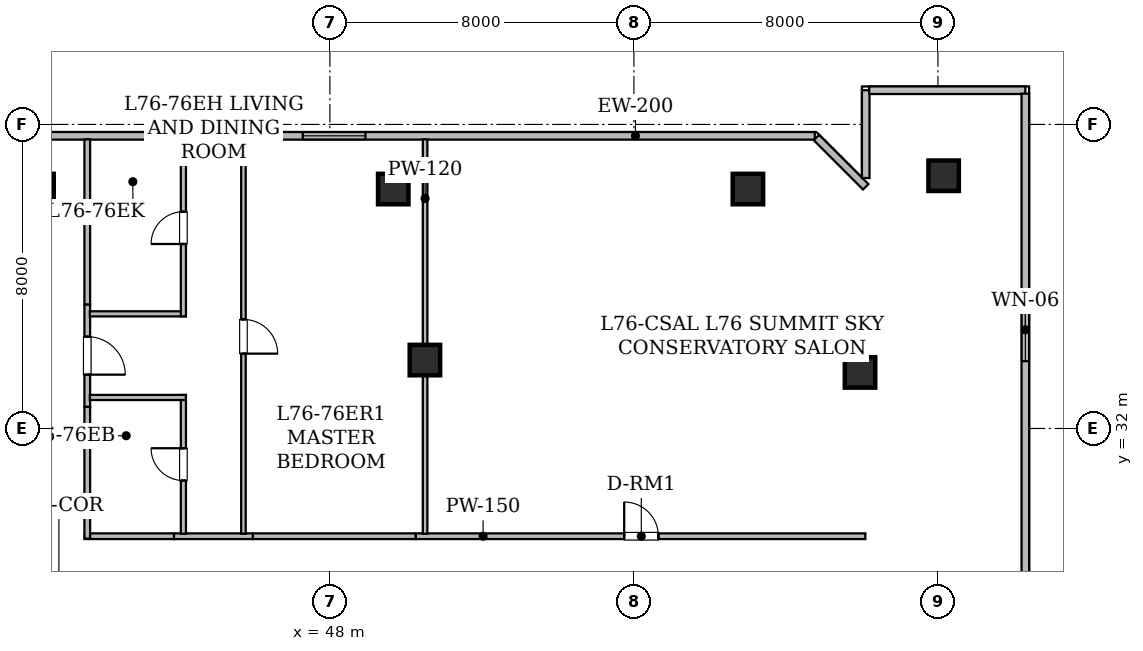
"""IFC4 building model, lengths in metres.
Left out: names, types, materials, properties, quantities, classifications, styles, units other than length and angle.
Written with IfcOpenShell. Run it as: python <this file> out.ifc"""

import sys

from ifc_helpers import new_model, si_unit, direction, frame, frame_2d, origin, origin_2d, place, context, subcontext, project, spatial, rectangle, hollow_rectangle, extrude, element, fill, save


model = new_model("IFC4")
c1 = context("Model", 3, precision=1e-05, world=origin(), true_north=direction((0.0, 1.0)))
c2 = subcontext(c1, "Body", "Model", "MODEL_VIEW")
j1 = project(units=[si_unit("LENGTHUNIT", "METRE"), si_unit("PLANEANGLEUNIT", "RADIAN")], contexts=[c1])
p1 = place(None, origin())
s1 = spatial("IfcSite", under=j1, at=p1, CompositionType="ELEMENT")
p2 = place(p1, origin())
s2 = spatial("IfcBuilding", under=s1, at=p2, CompositionType="ELEMENT")
p3 = place(p2, frame((0.0, 0.0, 298.85)))
s3 = spatial("IfcBuildingStorey", under=s2, at=p3, CompositionType="ELEMENT", Elevation=298.85)
for number, where, z_axis, x_axis in (
    (1, (40.333, 38.3, 0.0), (0.0, 0.0, 1.0), (1.0, 0.0, 0.0)),
    (2, (49.667, 38.3, 0.0), (0.0, 0.0, 1.0), (1.0, 0.0, 0.0)),
    (3, (59.0, 38.3, 0.0), (0.0, 0.0, 1.0), (1.0, 0.0, 0.0)),
    (4, (61.95, 33.475, 0.0), (0.0, 0.0, 1.0), (1.0, 0.0, 0.0)),
    (5, (50.5, 33.8, 0.0), (0.0, 0.0, 1.0), (1.0, 0.0, 0.0)),
):
    element("IfcColumn", number, at=place(p3, frame(where, z_axis=z_axis, x_axis=x_axis)), inside=s3, PredefinedType="COLUMN", context=c2, shape_type="SweptSolid", body=[
        extrude(hollow_rectangle(XDim=0.8, YDim=0.8, WallThickness=0.04, at=origin_2d()), origin(), (0.0, 0.0, 1.0), 4.2),
    ])
p4 = place(p3, frame((64.15, 38.65, 0.0), z_axis=(0.0, 0.0, 1.0), x_axis=(1.0, 0.0, 0.0)))
e6 = element("IfcColumn", 6, at=p4, inside=s3, PredefinedType="COLUMN", context=c2, shape_type="SweptSolid", body=[
    extrude(hollow_rectangle(XDim=0.8, YDim=0.8, WallThickness=0.04, at=origin_2d()), origin(), (0.0, 0.0, 1.0), 4.175),
])
p5 = place(p3, frame((29.302, 39.7, 0.0), z_axis=(0.0, 0.0, 1.0), x_axis=(1.0, 0.0, 0.0)))
e7 = element("IfcWall", 7, at=p5, inside=s3, PredefinedType="STANDARD", context=c2, shape_type="SweptSolid", body=[
    extrude(rectangle(XDim=31.457, YDim=0.2, at=frame_2d((15.729, 0.0))), origin(), (0.0, 0.0, 1.0), 3.33),
])
p6 = place(p5, frame((15.033, 0.0, 0.8)))
e8 = element("IfcOpeningElement", 8, at=p6, cuts=e7, PredefinedType="OPENING", context=c2, shape_type="SweptSolid", body=[
    extrude(rectangle(XDim=1.2, YDim=1.5, at=frame_2d((0.6, 0.75))), frame((0.0, 0.11, 0.0), z_axis=(0.0, -1.0, 0.0), x_axis=(1.0, 0.0, 0.0)), (0.0, 0.0, 1.0), 0.22),
])
p7 = place(p5, frame((17.983, 0.0, 0.85)))
e9 = element("IfcOpeningElement", 9, at=p7, cuts=e7, PredefinedType="OPENING", context=c2, shape_type="SweptSolid", body=[
    extrude(rectangle(XDim=1.65, YDim=1.55, at=frame_2d((0.825, 0.775))), frame((0.0, 0.11, 0.0), z_axis=(0.0, -1.0, 0.0), x_axis=(1.0, 0.0, 0.0)), (0.0, 0.0, 1.0), 0.22),
])
p8 = place(p3, frame((60.803, 39.656, 0.0), z_axis=(0.0, 0.0, 1.0), x_axis=(0.707106781187, -0.707106781187, 0.0)))
e10 = element("IfcWall", 10, at=p8, inside=s3, PredefinedType="STANDARD", context=c2, shape_type="SweptSolid", body=[
    extrude(rectangle(XDim=1.834, YDim=0.2, at=frame_2d((0.917, 0.0))), origin(), (0.0, 0.0, 1.0), 3.33),
])
p9 = place(p3, frame((62.1, 38.59, 0.0), z_axis=(0.0, 0.0, 1.0), x_axis=(0.0, 1.0, 0.0)))
e11 = element("IfcWall", 11, at=p9, inside=s3, PredefinedType="STANDARD", context=c2, shape_type="SweptSolid", body=[
    extrude(rectangle(XDim=2.31, YDim=0.2, at=frame_2d((1.155, 0.0))), origin(), (0.0, 0.0, 1.0), 3.33),
])
p10 = place(p3, frame((62.19, 40.9, 0.0), z_axis=(0.0, 0.0, 1.0), x_axis=(1.0, 0.0, 0.0)))
e12 = element("IfcWall", 12, at=p10, inside=s3, PredefinedType="STANDARD", context=c2, shape_type="SweptSolid", body=[
    extrude(rectangle(XDim=4.11, YDim=0.2, at=frame_2d((2.055, 0.0))), origin(), (0.0, 0.0, 1.0), 3.33),
])
p11 = place(p3, frame((66.3, 40.81, 0.0), z_axis=(0.0, 0.0, 1.0), x_axis=(0.0, -1.0, 0.0)))
e13 = element("IfcWall", 13, at=p11, inside=s3, PredefinedType="STANDARD", context=c2, shape_type="SweptSolid", body=[
    extrude(rectangle(XDim=25.71, YDim=0.2, at=frame_2d((12.855, 0.0))), origin(), (0.0, 0.0, 1.0), 3.33),
])
p12 = place(p11, frame((5.39, 0.0, 0.85)))
e14 = element("IfcOpeningElement", 14, at=p12, cuts=e13, PredefinedType="OPENING", context=c2, shape_type="SweptSolid", body=[
    extrude(rectangle(XDim=1.65, YDim=1.55, at=frame_2d((0.825, 0.775))), frame((0.0, 0.11, 0.0), z_axis=(0.0, -1.0, 0.0), x_axis=(1.0, 0.0, 0.0)), (0.0, 0.0, 1.0), 0.22),
])
p13 = place(p11, frame((17.414, 0.0, 0.8)))
e15 = element("IfcOpeningElement", 15, at=p13, cuts=e13, PredefinedType="OPENING", context=c2, shape_type="SweptSolid", body=[
    extrude(rectangle(XDim=1.2, YDim=1.5, at=frame_2d((0.6, 0.75))), frame((0.0, 0.11, 0.0), z_axis=(0.0, -1.0, 0.0), x_axis=(1.0, 0.0, 0.0)), (0.0, 0.0, 1.0), 0.22),
])
p14 = place(p11, frame((21.04, 0.0, 0.85)))
e16 = element("IfcOpeningElement", 16, at=p14, cuts=e13, PredefinedType="OPENING", context=c2, shape_type="SweptSolid", body=[
    extrude(rectangle(XDim=1.65, YDim=1.55, at=frame_2d((0.825, 0.775))), frame((0.0, 0.11, 0.0), z_axis=(0.0, -1.0, 0.0), x_axis=(1.0, 0.0, 0.0)), (0.0, 0.0, 1.0), 0.22),
])
p15 = place(p3, frame((50.256, 29.165, 0.0), z_axis=(0.0, 0.0, 1.0), x_axis=(1.0, 0.0, 0.0)))
e17 = element("IfcWall", 17, at=p15, inside=s3, PredefinedType="STANDARD", context=c2, shape_type="SweptSolid", body=[
    extrude(rectangle(XDim=11.834, YDim=0.15, at=frame_2d((5.917, 0.0))), origin(), (0.0, 0.0, 1.0), 3.175),
])
p16 = place(p15, frame((5.488, 0.0, 0.0)))
e18 = element("IfcOpeningElement", 18, at=p16, cuts=e17, PredefinedType="OPENING", context=c2, shape_type="SweptSolid", body=[
    extrude(rectangle(XDim=0.9, YDim=2.1, at=frame_2d((0.45, 1.05))), frame((0.0, 0.085, 0.0), z_axis=(0.0, -1.0, 0.0), x_axis=(1.0, 0.0, 0.0)), (0.0, 0.0, 1.0), 0.17),
])
p17 = place(p3, frame((43.896, 29.165, 0.0), z_axis=(0.0, 0.0, 1.0), x_axis=(1.0, 0.0, 0.0)))
e19 = element("IfcWall", 19, at=p17, inside=s3, PredefinedType="STANDARD", context=c2, shape_type="SweptSolid", body=[
    extrude(rectangle(XDim=2.078, YDim=0.15, at=frame_2d((1.039, 0.0))), origin(), (0.0, 0.0, 1.0), 3.88),
])
p18 = place(p3, frame((41.615, 35.265, 0.0), z_axis=(0.0, 0.0, 1.0), x_axis=(0.0, -1.0, 0.0)))
e20 = element("IfcWall", 20, at=p18, inside=s3, PredefinedType="STANDARD", context=c2, shape_type="SweptSolid", body=[
    extrude(rectangle(XDim=2.698, YDim=0.15, at=frame_2d((1.349, 0.0))), origin(), (0.0, 0.0, 1.0), 3.88),
])
p19 = place(p18, frame((0.849, 0.0, 0.0)))
e21 = element("IfcOpeningElement", 21, at=p19, cuts=e20, PredefinedType="OPENING", context=c2, shape_type="SweptSolid", body=[
    extrude(rectangle(XDim=1.0, YDim=2.15, at=frame_2d((0.5, 1.075))), frame((0.0, 0.085, 0.0), z_axis=(0.0, -1.0, 0.0), x_axis=(1.0, 0.0, 0.0)), (0.0, 0.0, 1.0), 0.17),
])
p20 = place(p3, frame((41.55, 29.165, 0.0), z_axis=(0.0, 0.0, 1.0), x_axis=(1.0, 0.0, 0.0)))
e22 = element("IfcWall", 22, at=p20, inside=s3, PredefinedType="STANDARD", context=c2, shape_type="SweptSolid", body=[
    extrude(rectangle(XDim=2.346, YDim=0.15, at=frame_2d((1.173, 0.0))), origin(), (0.0, 0.0, 1.0), 3.88),
])
p21 = place(p3, frame((41.615, 32.567, 0.0), z_axis=(0.0, 0.0, 1.0), x_axis=(0.0, -1.0, 0.0)))
e23 = element("IfcWall", 23, at=p21, inside=s3, PredefinedType="STANDARD", context=c2, shape_type="SweptSolid", body=[
    extrude(rectangle(XDim=3.465, YDim=0.15, at=frame_2d((1.732, 0.0))), origin(), (0.0, 0.0, 1.0), 3.88),
])
p22 = place(p3, frame((41.615, 39.608, 0.0), z_axis=(0.0, 0.0, 1.0), x_axis=(0.0, -1.0, 0.0)))
e24 = element("IfcWall", 24, at=p22, inside=s3, PredefinedType="STANDARD", context=c2, shape_type="SweptSolid", body=[
    extrude(rectangle(XDim=4.343, YDim=0.15, at=frame_2d((2.171, 0.0))), origin(), (0.0, 0.0, 1.0), 3.175),
])
p23 = place(p3, frame((45.974, 29.165, 0.0), z_axis=(0.0, 0.0, 1.0), x_axis=(1.0, 0.0, 0.0)))
e25 = element("IfcWall", 25, at=p23, inside=s3, PredefinedType="STANDARD", context=c2, shape_type="SweptSolid", body=[
    extrude(rectangle(XDim=4.282, YDim=0.15, at=frame_2d((2.141, 0.0))), origin(), (0.0, 0.0, 1.0), 3.88),
])
p24 = place(p3, frame((50.505, 29.23, 0.0), z_axis=(0.0, 0.0, 1.0), x_axis=(0.0, 1.0, 0.0)))
e26 = element("IfcWall", 26, at=p24, inside=s3, PredefinedType="PARTITIONING", context=c2, shape_type="SweptSolid", body=[
    extrude(rectangle(XDim=10.378, YDim=0.12, at=frame_2d((5.189, 0.0))), origin(), (0.0, 0.0, 1.0), 3.175),
])
p25 = place(p3, frame((44.145, 29.23, 0.0), z_axis=(0.0, 0.0, 1.0), x_axis=(0.0, 1.0, 0.0)))
e27 = element("IfcWall", 27, at=p25, inside=s3, PredefinedType="PARTITIONING", context=c2, shape_type="SweptSolid", body=[
    extrude(rectangle(XDim=3.651, YDim=0.135, at=frame_2d((1.826, 0.0))), origin(), (0.0, 0.0, 1.0), 3.88),
])
p26 = place(p25, frame((1.4, 0.0, 0.0)))
e28 = element("IfcOpeningElement", 28, at=p26, cuts=e27, PredefinedType="OPENING", context=c2, shape_type="SweptSolid", body=[
    extrude(rectangle(XDim=0.85, YDim=2.1, at=frame_2d((0.425, 1.05))), frame((0.0, 0.077, 0.0), z_axis=(0.0, -1.0, 0.0), x_axis=(1.0, 0.0, 0.0)), (0.0, 0.0, 1.0), 0.155),
])
for number, where, z_axis, x_axis in (
    (29, (44.21, 32.816, 0.0), (0.0, 0.0, 1.0), (-1.0, 0.0, 0.0)),
    (30, (41.682, 35.016, 0.0), (0.0, 0.0, 1.0), (1.0, 0.0, 0.0)),
):
    element("IfcWall", number, at=place(p3, frame(where, z_axis=z_axis, x_axis=x_axis)), inside=s3, PredefinedType="PARTITIONING", context=c2, shape_type="SweptSolid", body=[
        extrude(rectangle(XDim=2.528, YDim=0.135, at=frame_2d((1.264, 0.0))), origin(), (0.0, 0.0, 1.0), 3.88),
    ])
p27 = place(p3, frame((44.145, 34.951, 0.0), z_axis=(0.0, 0.0, 1.0), x_axis=(0.0, 1.0, 0.0)))
e31 = element("IfcWall", 31, at=p27, inside=s3, PredefinedType="PARTITIONING", context=c2, shape_type="SweptSolid", body=[
    extrude(rectangle(XDim=4.657, YDim=0.135, at=frame_2d((2.329, 0.0))), origin(), (0.0, 0.0, 1.0), 3.175),
])
p28 = place(p27, frame((1.903, 0.0, 0.0)))
e32 = element("IfcOpeningElement", 32, at=p28, cuts=e31, PredefinedType="OPENING", context=c2, shape_type="SweptSolid", body=[
    extrude(rectangle(XDim=0.85, YDim=2.1, at=frame_2d((0.425, 1.05))), frame((0.0, 0.077, 0.0), z_axis=(0.0, -1.0, 0.0), x_axis=(1.0, 0.0, 0.0)), (0.0, 0.0, 1.0), 0.155),
])
p29 = place(p3, frame((45.725, 39.608, 0.0), z_axis=(0.0, 0.0, 1.0), x_axis=(0.0, -1.0, 0.0)))
e33 = element("IfcWall", 33, at=p29, inside=s3, PredefinedType="PARTITIONING", context=c2, shape_type="SweptSolid", body=[
    extrude(rectangle(XDim=10.378, YDim=0.12, at=frame_2d((5.189, 0.0))), origin(), (0.0, 0.0, 1.0), 3.175),
])
p30 = place(p29, frame((4.739, 0.0, 0.0)))
e34 = element("IfcOpeningElement", 34, at=p30, cuts=e33, PredefinedType="OPENING", context=c2, shape_type="SweptSolid", body=[
    extrude(rectangle(XDim=0.9, YDim=2.1, at=frame_2d((0.45, 1.05))), frame((0.0, 0.07, 0.0), z_axis=(0.0, -1.0, 0.0), x_axis=(1.0, 0.0, 0.0)), (0.0, 0.0, 1.0), 0.14),
])
p31 = place(p12, origin())
e35 = element("IfcWindow", 35, at=p31, inside=s3, PartitioningType="SINGLE_PANEL", PredefinedType="WINDOW", context=c2, shape_type="SweptSolid", body=[
    extrude(rectangle(XDim=1.65, YDim=1.55, at=frame_2d((0.825, 0.775))), frame((0.0, 0.03, 0.0), z_axis=(0.0, -1.0, 0.0), x_axis=(1.0, 0.0, 0.0)), (0.0, 0.0, 1.0), 0.06),
])
fill(e14, e35)
p32 = place(p6, origin())
e36 = element("IfcWindow", 36, at=p32, inside=s3, PartitioningType="SINGLE_PANEL", PredefinedType="WINDOW", context=c2, shape_type="SweptSolid", body=[
    extrude(rectangle(XDim=1.2, YDim=1.5, at=frame_2d((0.6, 0.75))), frame((0.0, 0.03, 0.0), z_axis=(0.0, -1.0, 0.0), x_axis=(1.0, 0.0, 0.0)), (0.0, 0.0, 1.0), 0.06),
])
fill(e8, e36)
p33 = place(p7, origin())
e37 = element("IfcWindow", 37, at=p33, inside=s3, PartitioningType="SINGLE_PANEL", PredefinedType="WINDOW", context=c2, shape_type="SweptSolid", body=[
    extrude(rectangle(XDim=1.65, YDim=1.55, at=frame_2d((0.825, 0.775))), frame((0.0, 0.03, 0.0), z_axis=(0.0, -1.0, 0.0), x_axis=(1.0, 0.0, 0.0)), (0.0, 0.0, 1.0), 0.06),
])
fill(e9, e37)
p34 = place(p16, origin())
e38 = element("IfcDoor", 38, at=p34, inside=s3, OperationType="SINGLE_SWING_LEFT", PredefinedType="DOOR", context=c2, shape_type="SweptSolid", body=[
    extrude(rectangle(XDim=0.9, YDim=2.1, at=frame_2d((0.45, 1.05))), frame((0.0, 0.025, 0.0), z_axis=(0.0, -1.0, 0.0), x_axis=(1.0, 0.0, 0.0)), (0.0, 0.0, 1.0), 0.05),
])
fill(e18, e38)
p35 = place(p19, origin())
e39 = element("IfcDoor", 39, at=p35, inside=s3, OperationType="SINGLE_SWING_RIGHT", PredefinedType="DOOR", context=c2, shape_type="SweptSolid", body=[
    extrude(rectangle(XDim=1.0, YDim=2.15, at=frame_2d((0.5, 1.075))), frame((0.0, 0.025, 0.0), z_axis=(0.0, -1.0, 0.0), x_axis=(1.0, 0.0, 0.0)), (0.0, 0.0, 1.0), 0.05),
])
fill(e21, e39)
p36 = place(p26, origin())
e40 = element("IfcDoor", 40, at=p36, inside=s3, OperationType="SINGLE_SWING_RIGHT", PredefinedType="DOOR", context=c2, shape_type="SweptSolid", body=[
    extrude(rectangle(XDim=0.85, YDim=2.1, at=frame_2d((0.425, 1.05))), frame((0.0, 0.025, 0.0), z_axis=(0.0, -1.0, 0.0), x_axis=(1.0, 0.0, 0.0)), (0.0, 0.0, 1.0), 0.05),
])
fill(e28, e40)
p37 = place(p28, origin())
e41 = element("IfcDoor", 41, at=p37, inside=s3, OperationType="SINGLE_SWING_LEFT", PredefinedType="DOOR", context=c2, shape_type="SweptSolid", body=[
    extrude(rectangle(XDim=0.85, YDim=2.1, at=frame_2d((0.425, 1.05))), frame((0.0, 0.025, 0.0), z_axis=(0.0, -1.0, 0.0), x_axis=(1.0, 0.0, 0.0)), (0.0, 0.0, 1.0), 0.05),
])
fill(e32, e41)
p38 = place(p30, origin())
e42 = element("IfcDoor", 42, at=p38, inside=s3, OperationType="SINGLE_SWING_RIGHT", PredefinedType="DOOR", context=c2, shape_type="SweptSolid", body=[
    extrude(rectangle(XDim=0.9, YDim=2.1, at=frame_2d((0.45, 1.05))), frame((0.0, 0.025, 0.0), z_axis=(0.0, -1.0, 0.0), x_axis=(1.0, 0.0, 0.0)), (0.0, 0.0, 1.0), 0.05),
])
fill(e34, e42)
save(model, sys.argv[1])
